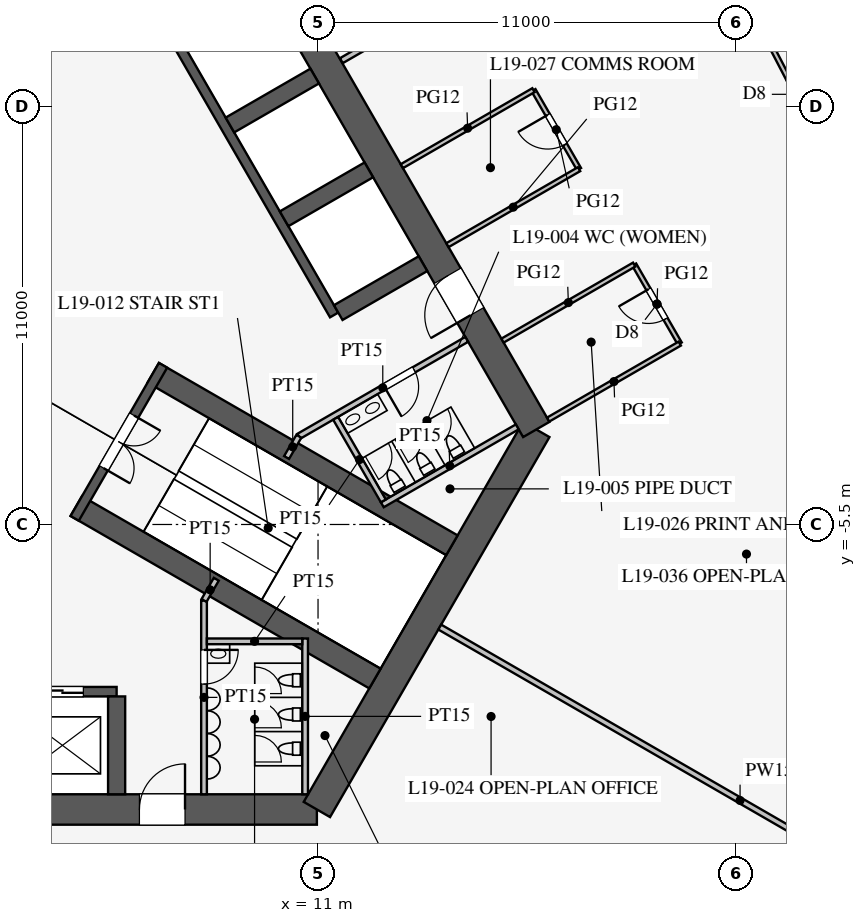
"""IFC4 building model, lengths in metres.
Left out: names, types, materials, properties, quantities, classifications, styles, units other than length and angle.
Written with IfcOpenShell. Run it as: python <this file> out.ifc"""

import sys

from ifc_helpers import new_model, si_unit, direction, frame, frame_2d, origin, place, context, subcontext, project, spatial, rectangle, extrude, element, fill, save


model = new_model("IFC4")
c1 = context("Model", 3, precision=1e-05, world=origin(), true_north=direction((0.0, 1.0)))
c2 = subcontext(c1, "Body", "Model", "MODEL_VIEW")
j1 = project(units=[si_unit("LENGTHUNIT", "METRE"), si_unit("PLANEANGLEUNIT", "RADIAN")], contexts=[c1])
p1 = place(None, origin())
s1 = spatial("IfcSite", under=j1, at=p1, CompositionType="ELEMENT")
p2 = place(p1, origin())
s2 = spatial("IfcBuilding", under=s1, at=p2, CompositionType="ELEMENT")
p3 = place(p2, frame((0.0, 0.0, 83.7)))
s3 = spatial("IfcBuildingStorey", under=s2, at=p3, CompositionType="ELEMENT", Elevation=83.7)
p4 = place(p3, frame((-10.97, -13.0, 0.0), z_axis=(0.0, 0.0, 1.0), x_axis=(1.0, 0.0, 0.0)))
e1 = element("IfcWall", 1, at=p4, inside=s3, PredefinedType="SHEAR", context=c2, shape_type="SweptSolid", body=[
    extrude(rectangle(XDim=21.939, YDim=0.8, at=frame_2d((10.97, 0.0))), origin(), (0.0, 0.0, 1.0), 4.2),
])
p5 = place(p4, frame((17.27, 0.0, 0.0)))
e2 = element("IfcOpeningElement", 2, at=p5, cuts=e1, PredefinedType="OPENING", context=c2, shape_type="SweptSolid", body=[
    extrude(rectangle(XDim=1.2, YDim=2.1, at=frame_2d((0.6, 1.05))), frame((0.0, 0.41, 0.0), z_axis=(0.0, -1.0, 0.0), x_axis=(1.0, 0.0, 0.0)), (0.0, 0.0, 1.0), 0.82),
])
p6 = place(p4, frame((3.47, 0.0, 0.0)))
e3 = element("IfcOpeningElement", 3, at=p6, cuts=e1, PredefinedType="OPENING", context=c2, shape_type="SweptSolid", body=[
    extrude(rectangle(XDim=1.2, YDim=2.1, at=frame_2d((0.6, 1.05))), frame((0.0, 0.41, 0.0), z_axis=(0.0, -1.0, 0.0), x_axis=(1.0, 0.0, 0.0)), (0.0, 0.0, 1.0), 0.82),
])
p7 = place(p3, frame((10.97, -13.0, 0.0), z_axis=(0.0, 0.0, 1.0), x_axis=(0.499995765644, 0.866027848477, 0.0)))
e4 = element("IfcWall", 4, at=p7, inside=s3, PredefinedType="SHEAR", context=c2, shape_type="SweptSolid", body=[
    extrude(rectangle(XDim=11.547, YDim=0.8, at=frame_2d((5.773, 0.0))), origin(), (0.0, 0.0, 1.0), 4.2),
])
p8 = place(p3, frame((16.743, -3.0, 0.0), z_axis=(0.0, 0.0, 1.0), x_axis=(-0.500002442456, 0.866023993627, 0.0)))
e5 = element("IfcWall", 5, at=p8, inside=s3, PredefinedType="SHEAR", context=c2, shape_type="SweptSolid", body=[
    extrude(rectangle(XDim=21.939, YDim=0.8, at=frame_2d((10.97, 0.0))), origin(), (0.0, 0.0, 1.0), 4.2),
])
p9 = place(p8, frame((17.27, 0.0, 0.0)))
e6 = element("IfcOpeningElement", 6, at=p9, cuts=e5, PredefinedType="OPENING", context=c2, shape_type="SweptSolid", body=[
    extrude(rectangle(XDim=1.2, YDim=2.1, at=frame_2d((0.6, 1.05))), frame((0.0, 0.41, 0.0), z_axis=(0.0, -1.0, 0.0), x_axis=(1.0, 0.0, 0.0)), (0.0, 0.0, 1.0), 0.82),
])
p10 = place(p8, frame((3.47, 0.0, 0.0)))
e7 = element("IfcOpeningElement", 7, at=p10, cuts=e5, PredefinedType="OPENING", context=c2, shape_type="SweptSolid", body=[
    extrude(rectangle(XDim=1.2, YDim=2.1, at=frame_2d((0.6, 1.05))), frame((0.0, 0.41, 0.0), z_axis=(0.0, -1.0, 0.0), x_axis=(1.0, 0.0, 0.0)), (0.0, 0.0, 1.0), 0.82),
])
p11 = place(p3, frame((-5.7, -9.9, 0.0), z_axis=(0.0, 0.0, 1.0), x_axis=(1.0, 0.0, 0.0)))
e8 = element("IfcWall", 8, at=p11, inside=s3, PredefinedType="SHEAR", context=c2, shape_type="SweptSolid", body=[
    extrude(rectangle(XDim=11.4, YDim=0.25, at=frame_2d((5.7, 0.0))), origin(), (0.0, 0.0, 1.0), 4.2),
])
p12 = place(p11, frame((0.875, 0.0, 0.0)))
e9 = element("IfcOpeningElement", 9, at=p12, cuts=e8, PredefinedType="OPENING", context=c2, shape_type="SweptSolid", body=[
    extrude(rectangle(XDim=1.1, YDim=2.2, at=frame_2d((0.55, 1.1))), frame((0.0, 0.135, 0.0), z_axis=(0.0, -1.0, 0.0), x_axis=(1.0, 0.0, 0.0)), (0.0, 0.0, 1.0), 0.27),
])
p13 = place(p11, frame((3.725, 0.0, 0.0)))
e10 = element("IfcOpeningElement", 10, at=p13, cuts=e8, PredefinedType="OPENING", context=c2, shape_type="SweptSolid", body=[
    extrude(rectangle(XDim=1.1, YDim=2.2, at=frame_2d((0.55, 1.1))), frame((0.0, 0.135, 0.0), z_axis=(0.0, -1.0, 0.0), x_axis=(1.0, 0.0, 0.0)), (0.0, 0.0, 1.0), 0.27),
])
p14 = place(p11, frame((6.575, 0.0, 0.0)))
e11 = element("IfcOpeningElement", 11, at=p14, cuts=e8, PredefinedType="OPENING", context=c2, shape_type="SweptSolid", body=[
    extrude(rectangle(XDim=1.1, YDim=2.2, at=frame_2d((0.55, 1.1))), frame((0.0, 0.135, 0.0), z_axis=(0.0, -1.0, 0.0), x_axis=(1.0, 0.0, 0.0)), (0.0, 0.0, 1.0), 0.27),
])
p15 = place(p11, frame((9.425, 0.0, 0.0)))
e12 = element("IfcOpeningElement", 12, at=p15, cuts=e8, PredefinedType="OPENING", context=c2, shape_type="SweptSolid", body=[
    extrude(rectangle(XDim=1.1, YDim=2.2, at=frame_2d((0.55, 1.1))), frame((0.0, 0.135, 0.0), z_axis=(0.0, -1.0, 0.0), x_axis=(1.0, 0.0, 0.0)), (0.0, 0.0, 1.0), 0.27),
])
p16 = place(p3, frame((5.7, -10.025, 0.0), z_axis=(0.0, 0.0, 1.0), x_axis=(0.0, -1.0, 0.0)))
e13 = element("IfcWall", 13, at=p16, inside=s3, PredefinedType="SHEAR", context=c2, shape_type="SweptSolid", body=[
    extrude(rectangle(XDim=2.575, YDim=0.45, at=frame_2d((1.288, 0.0))), origin(), (0.0, 0.0, 1.0), 4.2),
])
p17 = place(p3, frame((11.424, 0.014, 0.0), z_axis=(0.0, 0.0, 1.0), x_axis=(-0.500001763848, 0.866024385424, 0.0)))
e14 = element("IfcWall", 14, at=p17, inside=s3, PredefinedType="SHEAR", context=c2, shape_type="SweptSolid", body=[
    extrude(rectangle(XDim=11.4, YDim=0.25, at=frame_2d((5.7, 0.0))), origin(), (0.0, 0.0, 1.0), 4.2),
])
for number, where, z_axis, x_axis in (
    (15, (11.532, 0.076, 0.0), (0.0, 0.0, 1.0), (0.866, 0.5, 0.0)),
    (16, (10.107, 2.544, 0.0), (0.0, 0.0, 1.0), (0.866, 0.5, 0.0)),
    (17, (8.682, 5.012, 0.0), (0.0, 0.0, 1.0), (0.866, 0.5, 0.0)),
):
    element("IfcWall", number, at=place(p3, frame(where, z_axis=z_axis, x_axis=x_axis)), inside=s3, PredefinedType="SHEAR", context=c2, shape_type="SweptSolid", body=[
        extrude(rectangle(XDim=2.575, YDim=0.45, at=frame_2d((1.288, 0.0))), origin(), (0.0, 0.0, 1.0), 4.2),
    ])
for number, where, z_axis, x_axis in (
    (18, (4.638, -5.016, 0.0), (0.0, 0.0, 1.0), (0.866, -0.5, 0.0)),
    (19, (6.663, -1.509, 0.0), (0.0, 0.0, 1.0), (0.866, -0.5, 0.0)),
):
    element("IfcWall", number, at=place(p3, frame(where, z_axis=z_axis, x_axis=x_axis)), inside=s3, PredefinedType="SHEAR", context=c2, shape_type="SweptSolid", body=[
        extrude(rectangle(XDim=9.075, YDim=0.6, at=frame_2d((4.538, 0.0))), origin(), (0.0, 0.0, 1.0), 4.2),
    ])
p18 = place(p3, frame((4.597, -5.339, 0.0), z_axis=(0.0, 0.0, 1.0), x_axis=(0.499984536904, 0.866034331223, 0.0)))
e20 = element("IfcWall", 20, at=p18, inside=s3, PredefinedType="SHEAR", context=c2, shape_type="SweptSolid", body=[
    extrude(rectangle(XDim=4.65, YDim=0.25, at=frame_2d((2.325, 0.0))), origin(), (0.0, 0.0, 1.0), 4.2),
])
p19 = place(p18, frame((1.525, 0.0, 0.0)))
e21 = element("IfcOpeningElement", 21, at=p19, cuts=e20, PredefinedType="OPENING", context=c2, shape_type="SweptSolid", body=[
    extrude(rectangle(XDim=1.6, YDim=2.1, at=frame_2d((0.8, 1.05))), frame((0.0, 0.135, 0.0), z_axis=(0.0, -1.0, 0.0), x_axis=(1.0, 0.0, 0.0)), (0.0, 0.0, 1.0), 0.27),
])
p20 = place(p3, frame((8.0, -7.5, 0.0), z_axis=(0.0, 0.0, 1.0), x_axis=(0.0, -1.0, 0.0)))
e22 = element("IfcWall", 22, at=p20, inside=s3, PredefinedType="PARTITIONING", context=c2, shape_type="SweptSolid", body=[
    extrude(rectangle(XDim=5.1, YDim=0.15, at=frame_2d((2.55, 0.0))), origin(), (0.0, 0.0, 1.0), 4.0),
])
p21 = place(p20, frame((1.3, 0.0, 0.0)))
e23 = element("IfcOpeningElement", 23, at=p21, cuts=e22, PredefinedType="OPENING", context=c2, shape_type="SweptSolid", body=[
    extrude(rectangle(XDim=0.9, YDim=2.1, at=frame_2d((0.45, 1.05))), frame((0.0, 0.085, 0.0), z_axis=(0.0, -1.0, 0.0), x_axis=(1.0, 0.0, 0.0)), (0.0, 0.0, 1.0), 0.17),
])
p22 = place(p3, frame((10.495, -3.178, 0.0), z_axis=(0.0, 0.0, 1.0), x_axis=(0.86602216432, 0.500005610874, 0.0)))
e24 = element("IfcWall", 24, at=p22, inside=s3, PredefinedType="PARTITIONING", context=c2, shape_type="SweptSolid", body=[
    extrude(rectangle(XDim=5.1, YDim=0.15, at=frame_2d((2.55, 0.0))), origin(), (0.0, 0.0, 1.0), 4.0),
])
p23 = place(p22, frame((2.6, 0.0, 0.0)))
e25 = element("IfcOpeningElement", 25, at=p23, cuts=e24, PredefinedType="OPENING", context=c2, shape_type="SweptSolid", body=[
    extrude(rectangle(XDim=0.9, YDim=2.1, at=frame_2d((0.45, 1.05))), frame((0.0, 0.085, 0.0), z_axis=(0.0, -1.0, 0.0), x_axis=(1.0, 0.0, 0.0)), (0.0, 0.0, 1.0), 0.17),
])
for number, where, z_axis, x_axis in (
    (26, (8.0, -7.5, 0.0), (0.0, 0.0, 1.0), (0.5, 0.866, 0.0)),
    (27, (10.495, -3.178, 0.0), (0.0, 0.0, 1.0), (-0.5, -0.866, 0.0)),
):
    element("IfcWall", number, at=place(p3, frame(where, z_axis=z_axis, x_axis=x_axis)), inside=s3, PredefinedType="PARTITIONING", context=c2, shape_type="SweptSolid", body=[
        extrude(rectangle(XDim=0.645, YDim=0.15, at=frame_2d((0.323, 0.0))), origin(), (0.0, 0.0, 1.0), 4.0),
    ])
p24 = place(p3, frame((10.66, -8.5, 0.0), z_axis=(0.0, 0.0, 1.0), x_axis=(0.0, -1.0, 0.0)))
e28 = element("IfcWall", 28, at=p24, inside=s3, PredefinedType="PARTITIONING", context=c2, shape_type="SweptSolid", body=[
    extrude(rectangle(XDim=4.1, YDim=0.15, at=frame_2d((2.05, 0.0))), origin(), (0.0, 0.0, 1.0), 4.0),
])
p25 = place(p3, frame((8.075, -8.575, 0.0), z_axis=(0.0, 0.0, 1.0), x_axis=(1.0, 0.0, 0.0)))
e29 = element("IfcWall", 29, at=p25, inside=s3, PredefinedType="PARTITIONING", context=c2, shape_type="SweptSolid", body=[
    extrude(rectangle(XDim=2.51, YDim=0.15, at=frame_2d((1.255, 0.0))), origin(), (0.0, 0.0, 1.0), 4.0),
])
p26 = place(p3, frame((12.691, -4.982, 0.0), z_axis=(0.0, 0.0, 1.0), x_axis=(0.8660249478, 0.500000789788, 0.0)))
e30 = element("IfcWall", 30, at=p26, inside=s3, PredefinedType="PARTITIONING", context=c2, shape_type="SweptSolid", body=[
    extrude(rectangle(XDim=4.1, YDim=0.15, at=frame_2d((2.05, 0.0))), origin(), (0.0, 0.0, 1.0), 4.0),
])
p27 = place(p3, frame((11.464, -2.706, 0.0), z_axis=(0.0, 0.0, 1.0), x_axis=(0.50001992892, -0.866013897511, 0.0)))
e31 = element("IfcWall", 31, at=p27, inside=s3, PredefinedType="PARTITIONING", context=c2, shape_type="SweptSolid", body=[
    extrude(rectangle(XDim=2.51, YDim=0.15, at=frame_2d((1.255, 0.0))), origin(), (0.0, 0.0, 1.0), 4.0),
])
p28 = place(p3, frame((14.203, -8.2, 0.0), z_axis=(0.0, 0.0, 1.0), x_axis=(0.866024965723, -0.500000758745, 0.0)))
e32 = element("IfcWall", 32, at=p28, inside=s3, PredefinedType="PARTITIONING", context=c2, shape_type="SweptSolid", body=[
    extrude(rectangle(XDim=18.25, YDim=0.15, at=frame_2d((9.125, 0.0))), origin(), (0.0, 0.0, 1.0), 2.3),
])
p29 = place(p3, frame((11.613, 6.705, 0.0), z_axis=(0.0, 0.0, 1.0), x_axis=(0.866029791586, 0.499992400027, 0.0)))
e33 = element("IfcWall", 33, at=p29, inside=s3, PredefinedType="PARTITIONING", context=c2, shape_type="SweptSolid", body=[
    extrude(rectangle(XDim=12.709, YDim=0.15, at=frame_2d((6.354, 0.0))), origin(), (0.0, 0.0, 1.0), 2.6),
])
p30 = place(p3, frame((20.519, -0.74, 0.0), z_axis=(0.0, 0.0, 1.0), x_axis=(-0.499957262057, 0.866050077142, 0.0)))
e34 = element("IfcWall", 34, at=p30, inside=s3, PredefinedType="PARTITIONING", context=c2, shape_type="SweptSolid", body=[
    extrude(rectangle(XDim=2.4, YDim=0.12, at=frame_2d((1.2, 0.0))), origin(), (0.0, 0.0, 1.0), 2.9),
])
p31 = place(p30, frame((0.75, 0.0, 0.15)))
e35 = element("IfcOpeningElement", 35, at=p31, cuts=e34, PredefinedType="OPENING", context=c2, shape_type="SweptSolid", body=[
    extrude(rectangle(XDim=0.9, YDim=2.1, at=frame_2d((0.45, 1.05))), frame((0.0, 0.07, 0.0), z_axis=(0.0, -1.0, 0.0), x_axis=(1.0, 0.0, 0.0)), (0.0, 0.0, 1.0), 0.14),
])
p32 = place(p3, frame((17.869, 3.85, 0.0), z_axis=(0.0, 0.0, 1.0), x_axis=(-0.500001309137, 0.866024647952, 0.0)))
e36 = element("IfcWall", 36, at=p32, inside=s3, PredefinedType="PARTITIONING", context=c2, shape_type="SweptSolid", body=[
    extrude(rectangle(XDim=2.4, YDim=0.12, at=frame_2d((1.2, 0.0))), origin(), (0.0, 0.0, 1.0), 2.9),
])
p33 = place(p32, frame((0.75, 0.0, 0.15)))
e37 = element("IfcOpeningElement", 37, at=p33, cuts=e36, PredefinedType="OPENING", context=c2, shape_type="SweptSolid", body=[
    extrude(rectangle(XDim=0.9, YDim=2.1, at=frame_2d((0.45, 1.05))), frame((0.0, 0.07, 0.0), z_axis=(0.0, -1.0, 0.0), x_axis=(1.0, 0.0, 0.0)), (0.0, 0.0, 1.0), 0.14),
])
for number, where, z_axis, x_axis in (
    (38, (17.055, -2.74, 0.0), (0.0, 0.0, 1.0), (0.866, 0.5, 0.0)),
    (39, (13.205, 3.929, 0.0), (0.0, 0.0, 1.0), (0.866, 0.5, 0.0)),
    (40, (14.405, 1.85, 0.0), (0.0, 0.0, 1.0), (0.866, 0.5, 0.0)),
    (41, (15.855, -0.661, 0.0), (0.0, 0.0, 1.0), (0.866, 0.5, 0.0)),
):
    element("IfcWall", number, at=place(p3, frame(where, z_axis=z_axis, x_axis=x_axis)), inside=s3, PredefinedType="PARTITIONING", context=c2, shape_type="SweptSolid", body=[
        extrude(rectangle(XDim=4.0, YDim=0.12, at=frame_2d((2.0, 0.0))), origin(), (0.0, 0.0, 1.0), 2.9),
    ])
p34 = place(p3, frame((24.624, 3.824, 0.0), z_axis=(0.0, 0.0, 1.0), x_axis=(-0.461810056307, 0.886978845235, 0.0)))
e42 = element("IfcWall", 42, at=p34, inside=s3, PredefinedType="PARTITIONING", context=c2, shape_type="SweptSolid", body=[
    extrude(rectangle(XDim=4.504, YDim=0.12, at=frame_2d((2.252, 0.0))), origin(), (0.0, 0.0, 1.0), 2.9),
])
p35 = place(p34, frame((1.8, 0.0, 0.15)))
e43 = element("IfcOpeningElement", 43, at=p35, cuts=e42, PredefinedType="OPENING", context=c2, shape_type="SweptSolid", body=[
    extrude(rectangle(XDim=0.9, YDim=2.1, at=frame_2d((0.45, 1.05))), frame((0.0, 0.07, 0.0), z_axis=(0.0, -1.0, 0.0), x_axis=(1.0, 0.0, 0.0)), (0.0, 0.0, 1.0), 0.14),
])
p36 = place(p21, origin())
e44 = element("IfcDoor", 44, at=p36, inside=s3, OperationType="SINGLE_SWING_LEFT", PredefinedType="DOOR", context=c2, shape_type="SweptSolid", body=[
    extrude(rectangle(XDim=0.9, YDim=2.1, at=frame_2d((0.45, 1.05))), frame((0.0, 0.025, 0.0), z_axis=(0.0, -1.0, 0.0), x_axis=(1.0, 0.0, 0.0)), (0.0, 0.0, 1.0), 0.05),
])
fill(e23, e44)
p37 = place(p23, frame((0.9, 0.0, 0.0), z_axis=(0.0, 0.0, 1.0), x_axis=(-1.0, 0.0, 0.0)))
e45 = element("IfcDoor", 45, at=p37, inside=s3, OperationType="SINGLE_SWING_RIGHT", PredefinedType="DOOR", context=c2, shape_type="SweptSolid", body=[
    extrude(rectangle(XDim=0.9, YDim=2.1, at=frame_2d((0.45, 1.05))), frame((0.0, 0.025, 0.0), z_axis=(0.0, -1.0, 0.0), x_axis=(1.0, 0.0, 0.0)), (0.0, 0.0, 1.0), 0.05),
])
fill(e25, e45)
p38 = place(p19, frame((1.6, 0.0, 0.0), z_axis=(0.0, 0.0, 1.0), x_axis=(-1.0, 0.0, 0.0)))
e46 = element("IfcDoor", 46, at=p38, inside=s3, OperationType="DOUBLE_DOOR_SINGLE_SWING", PredefinedType="DOOR", context=c2, shape_type="SweptSolid", body=[
    extrude(rectangle(XDim=1.6, YDim=2.1, at=frame_2d((0.8, 1.05))), frame((0.0, 0.025, 0.0), z_axis=(0.0, -1.0, 0.0), x_axis=(1.0, 0.0, 0.0)), (0.0, 0.0, 1.0), 0.05),
])
fill(e21, e46)
p39 = place(p5, origin())
e47 = element("IfcDoor", 47, at=p39, inside=s3, OperationType="SINGLE_SWING_RIGHT", PredefinedType="DOOR", context=c2, shape_type="SweptSolid", body=[
    extrude(rectangle(XDim=1.2, YDim=2.1, at=frame_2d((0.6, 1.05))), frame((0.0, 0.025, 0.0), z_axis=(0.0, -1.0, 0.0), x_axis=(1.0, 0.0, 0.0)), (0.0, 0.0, 1.0), 0.05),
])
fill(e2, e47)
p40 = place(p10, origin())
e48 = element("IfcDoor", 48, at=p40, inside=s3, OperationType="SINGLE_SWING_LEFT", PredefinedType="DOOR", context=c2, shape_type="SweptSolid", body=[
    extrude(rectangle(XDim=1.2, YDim=2.1, at=frame_2d((0.6, 1.05))), frame((0.0, 0.025, 0.0), z_axis=(0.0, -1.0, 0.0), x_axis=(1.0, 0.0, 0.0)), (0.0, 0.0, 1.0), 0.05),
])
fill(e7, e48)
p41 = place(p31, origin())
e49 = element("IfcDoor", 49, at=p41, inside=s3, OperationType="SINGLE_SWING_RIGHT", PredefinedType="DOOR", context=c2, shape_type="SweptSolid", body=[
    extrude(rectangle(XDim=0.9, YDim=2.1, at=frame_2d((0.45, 1.05))), frame((0.0, 0.025, 0.0), z_axis=(0.0, -1.0, 0.0), x_axis=(1.0, 0.0, 0.0)), (0.0, 0.0, 1.0), 0.05),
])
fill(e35, e49)
p42 = place(p33, origin())
e50 = element("IfcDoor", 50, at=p42, inside=s3, OperationType="SINGLE_SWING_RIGHT", PredefinedType="DOOR", context=c2, shape_type="SweptSolid", body=[
    extrude(rectangle(XDim=0.9, YDim=2.1, at=frame_2d((0.45, 1.05))), frame((0.0, 0.025, 0.0), z_axis=(0.0, -1.0, 0.0), x_axis=(1.0, 0.0, 0.0)), (0.0, 0.0, 1.0), 0.05),
])
fill(e37, e50)
p43 = place(p15, origin())
e51 = element("IfcDoor", 51, at=p43, inside=s3, OperationType="DOUBLE_DOOR_SLIDING", PredefinedType="DOOR", context=c2, shape_type="SweptSolid", body=[
    extrude(rectangle(XDim=1.1, YDim=2.2, at=frame_2d((0.55, 1.1))), frame((0.0, 0.025, 0.0), z_axis=(0.0, -1.0, 0.0), x_axis=(1.0, 0.0, 0.0)), (0.0, 0.0, 1.0), 0.05),
])
fill(e12, e51)
save(model, sys.argv[1])
